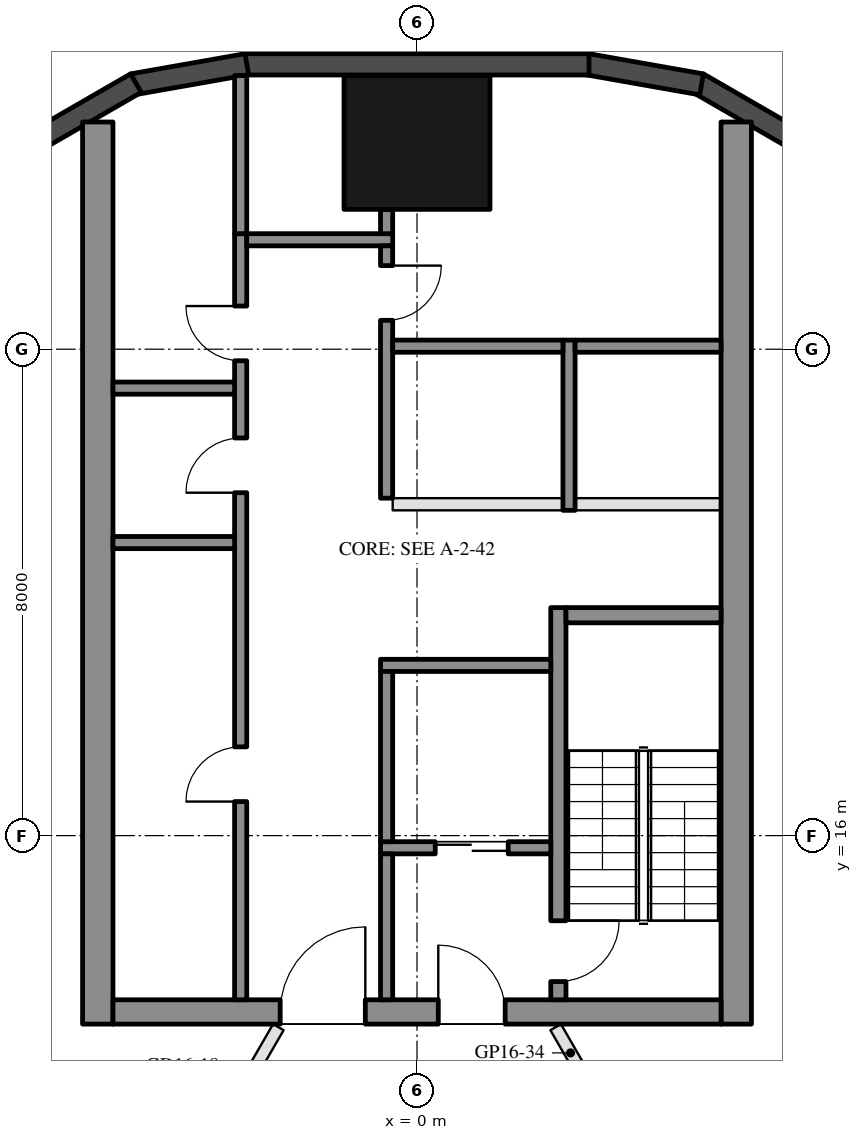
"""IFC4 building model, lengths in metres.
Left out: names, types, materials, properties, quantities, classifications, styles, units other than length and angle.
Written with IfcOpenShell. Run it as: python <this file> out.ifc"""

import sys

from ifc_helpers import new_model, si_unit, direction, frame, frame_2d, origin, origin_2d, place, context, subcontext, project, spatial, rectangle, hollow_rectangle, extrude, element, fill, save


model = new_model("IFC4")
c1 = context("Model", 3, precision=1e-05, world=origin(), true_north=direction((0.0, 1.0)))
c2 = subcontext(c1, "Body", "Model", "MODEL_VIEW")
j1 = project(units=[si_unit("LENGTHUNIT", "METRE"), si_unit("PLANEANGLEUNIT", "RADIAN")], contexts=[c1])
p1 = place(None, origin())
s1 = spatial("IfcSite", under=j1, at=p1, CompositionType="ELEMENT")
p2 = place(p1, origin())
s2 = spatial("IfcBuilding", under=s1, at=p2, CompositionType="ELEMENT")
p3 = place(p2, frame((0.0, 0.0, 179.9)))
s3 = spatial("IfcBuildingStorey", under=s2, at=p3, CompositionType="ELEMENT", Elevation=179.9)
p4 = place(p3, frame((0.0, 27.4, 0.0), z_axis=(0.0, 0.0, 1.0), x_axis=(1.0, 0.0, 0.0)))
e1 = element("IfcColumn", 1, at=p4, inside=s3, PredefinedType="COLUMN", context=c2, shape_type="SweptSolid", body=[
    extrude(hollow_rectangle(XDim=2.4, YDim=2.2, WallThickness=0.06, at=origin_2d()), origin(), (0.0, 0.0, 1.0), 3.7),
])
for number, where, z_axis, x_axis in (
    (2, (6.277, 27.422, 0.0), (0.0, 0.0, 1.0), (-0.866, 0.5, 0.0)),
    (3, (4.68, 28.356, 0.0), (0.0, 0.0, 1.0), (-0.985, 0.174, 0.0)),
):
    element("IfcWall", number, at=place(p3, frame(where, z_axis=z_axis, x_axis=x_axis)), inside=s3, PredefinedType="SOLIDWALL", context=c2, shape_type="SweptSolid", body=[
        extrude(rectangle(XDim=1.91, YDim=0.35, at=frame_2d((0.955, 0.0))), origin(), (0.0, 0.0, 1.0), 3.55),
    ])
p5 = place(p3, frame((2.829, 28.685, 0.0), z_axis=(0.0, 0.0, 1.0), x_axis=(-1.0, 0.0, 0.0)))
e4 = element("IfcWall", 4, at=p5, inside=s3, PredefinedType="SOLIDWALL", context=c2, shape_type="SweptSolid", body=[
    extrude(rectangle(XDim=5.658, YDim=0.35, at=frame_2d((2.829, 0.0))), origin(), (0.0, 0.0, 1.0), 3.55),
])
for number, where, z_axis, x_axis in (
    (5, (-2.799, 28.688, 0.0), (0.0, 0.0, 1.0), (-0.985, -0.174, 0.0)),
    (6, (-4.623, 28.377, 0.0), (0.0, 0.0, 1.0), (-0.866, -0.5, 0.0)),
):
    element("IfcWall", number, at=place(p3, frame(where, z_axis=z_axis, x_axis=x_axis)), inside=s3, PredefinedType="SOLIDWALL", context=c2, shape_type="SweptSolid", body=[
        extrude(rectangle(XDim=1.91, YDim=0.35, at=frame_2d((0.955, 0.0))), origin(), (0.0, 0.0, 1.0), 3.55),
    ])
for number, where, z_axis, x_axis in (
    (7, (5.25, 12.9, 0.0), (0.0, 0.0, 1.0), (0.0, 1.0, 0.0)),
    (8, (-5.25, 12.9, 0.0), (0.0, 0.0, 1.0), (0.0, 1.0, 0.0)),
):
    element("IfcWall", number, at=place(p3, frame(where, z_axis=z_axis, x_axis=x_axis)), inside=s3, PredefinedType="SHEAR", context=c2, shape_type="SweptSolid", body=[
        extrude(rectangle(XDim=14.837, YDim=0.5, at=frame_2d((7.418, 0.0))), origin(), (0.0, 0.0, 1.0), 3.5),
    ])
p6 = place(p3, frame((5.0, 13.1, 0.0), z_axis=(0.0, 0.0, 1.0), x_axis=(-1.0, 0.0, 0.0)))
e9 = element("IfcWall", 9, at=p6, inside=s3, PredefinedType="SHEAR", context=c2, shape_type="SweptSolid", body=[
    extrude(rectangle(XDim=10.0, YDim=0.4, at=frame_2d((5.0, 0.0))), origin(), (0.0, 0.0, 1.0), 3.5),
])
p7 = place(p6, frame((3.55, 0.0, 0.0)))
e10 = element("IfcOpeningElement", 10, at=p7, cuts=e9, PredefinedType="OPENING", context=c2, shape_type="SweptSolid", body=[
    extrude(rectangle(XDim=1.1, YDim=2.1, at=frame_2d((0.55, 1.05))), frame((0.0, 0.21, 0.0), z_axis=(0.0, -1.0, 0.0), x_axis=(1.0, 0.0, 0.0)), (0.0, 0.0, 1.0), 0.42),
])
p8 = place(p6, frame((5.85, 0.0, 0.0)))
e11 = element("IfcOpeningElement", 11, at=p8, cuts=e9, PredefinedType="OPENING", context=c2, shape_type="SweptSolid", body=[
    extrude(rectangle(XDim=1.4, YDim=2.1, at=frame_2d((0.7, 1.05))), frame((0.0, 0.21, 0.0), z_axis=(0.0, -1.0, 0.0), x_axis=(1.0, 0.0, 0.0)), (0.0, 0.0, 1.0), 0.42),
])
p9 = place(p3, frame((2.325, 13.3, 0.0), z_axis=(0.0, 0.0, 1.0), x_axis=(0.0, 1.0, 0.0)))
e12 = element("IfcWall", 12, at=p9, inside=s3, PredefinedType="SHEAR", context=c2, shape_type="SweptSolid", body=[
    extrude(rectangle(XDim=6.45, YDim=0.25, at=frame_2d((3.225, 0.0))), origin(), (0.0, 0.0, 1.0), 3.5),
])
p10 = place(p9, frame((0.3, 0.0, 0.0)))
e13 = element("IfcOpeningElement", 13, at=p10, cuts=e12, PredefinedType="OPENING", context=c2, shape_type="SweptSolid", body=[
    extrude(rectangle(XDim=1.0, YDim=2.1, at=frame_2d((0.5, 1.05))), frame((0.0, 0.135, 0.0), z_axis=(0.0, -1.0, 0.0), x_axis=(1.0, 0.0, 0.0)), (0.0, 0.0, 1.0), 0.27),
])
p11 = place(p3, frame((5.0, 19.625, 0.0), z_axis=(0.0, 0.0, 1.0), x_axis=(-1.0, 0.0, 0.0)))
e14 = element("IfcWall", 14, at=p11, inside=s3, PredefinedType="SHEAR", context=c2, shape_type="SweptSolid", body=[
    extrude(rectangle(XDim=2.55, YDim=0.25, at=frame_2d((1.275, 0.0))), origin(), (0.0, 0.0, 1.0), 3.5),
])
p12 = place(p3, frame((2.2, 18.8, 0.0), z_axis=(0.0, 0.0, 1.0), x_axis=(-1.0, 0.0, 0.0)))
e15 = element("IfcWall", 15, at=p12, inside=s3, PredefinedType="SHEAR", context=c2, shape_type="SweptSolid", body=[
    extrude(rectangle(XDim=2.8, YDim=0.2, at=frame_2d((1.4, 0.0))), origin(), (0.0, 0.0, 1.0), 3.5),
])
p13 = place(p3, frame((2.2, 15.8, 0.0), z_axis=(0.0, 0.0, 1.0), x_axis=(-1.0, 0.0, 0.0)))
e16 = element("IfcWall", 16, at=p13, inside=s3, PredefinedType="SHEAR", context=c2, shape_type="SweptSolid", body=[
    extrude(rectangle(XDim=2.8, YDim=0.2, at=frame_2d((1.4, 0.0))), origin(), (0.0, 0.0, 1.0), 3.5),
])
p14 = place(p13, frame((0.7, 0.0, 0.0)))
e17 = element("IfcOpeningElement", 17, at=p14, cuts=e16, PredefinedType="OPENING", context=c2, shape_type="SweptSolid", body=[
    extrude(rectangle(XDim=1.2, YDim=2.1, at=frame_2d((0.6, 1.05))), frame((0.0, 0.11, 0.0), z_axis=(0.0, -1.0, 0.0), x_axis=(1.0, 0.0, 0.0)), (0.0, 0.0, 1.0), 0.22),
])
p15 = place(p3, frame((-0.5, 15.9, 0.0), z_axis=(0.0, 0.0, 1.0), x_axis=(0.0, 1.0, 0.0)))
e18 = element("IfcWall", 18, at=p15, inside=s3, PredefinedType="SHEAR", context=c2, shape_type="SweptSolid", body=[
    extrude(rectangle(XDim=2.8, YDim=0.2, at=frame_2d((1.4, 0.0))), origin(), (0.0, 0.0, 1.0), 3.5),
])
p16 = place(p3, frame((-0.5, 13.3, 0.0), z_axis=(0.0, 0.0, 1.0), x_axis=(0.0, 1.0, 0.0)))
e19 = element("IfcWall", 19, at=p16, inside=s3, PredefinedType="SHEAR", context=c2, shape_type="SweptSolid", body=[
    extrude(rectangle(XDim=2.4, YDim=0.2, at=frame_2d((1.2, 0.0))), origin(), (0.0, 0.0, 1.0), 3.5),
])
p17 = place(p3, frame((-2.9, 13.3, 0.0), z_axis=(0.0, 0.0, 1.0), x_axis=(0.0, 1.0, 0.0)))
e20 = element("IfcWall", 20, at=p17, inside=s3, PredefinedType="SHEAR", context=c2, shape_type="SweptSolid", body=[
    extrude(rectangle(XDim=12.6, YDim=0.2, at=frame_2d((6.3, 0.0))), origin(), (0.0, 0.0, 1.0), 3.5),
])
p18 = place(p17, frame((3.26, 0.0, 0.0)))
e21 = element("IfcOpeningElement", 21, at=p18, cuts=e20, PredefinedType="OPENING", context=c2, shape_type="SweptSolid", body=[
    extrude(rectangle(XDim=0.9, YDim=2.1, at=frame_2d((0.45, 1.05))), frame((0.0, 0.11, 0.0), z_axis=(0.0, -1.0, 0.0), x_axis=(1.0, 0.0, 0.0)), (0.0, 0.0, 1.0), 0.22),
])
p19 = place(p17, frame((8.34, 0.0, 0.0)))
e22 = element("IfcOpeningElement", 22, at=p19, cuts=e20, PredefinedType="OPENING", context=c2, shape_type="SweptSolid", body=[
    extrude(rectangle(XDim=0.9, YDim=2.1, at=frame_2d((0.45, 1.05))), frame((0.0, 0.11, 0.0), z_axis=(0.0, -1.0, 0.0), x_axis=(1.0, 0.0, 0.0)), (0.0, 0.0, 1.0), 0.22),
])
p20 = place(p17, frame((10.51, 0.0, 0.0)))
e23 = element("IfcOpeningElement", 23, at=p20, cuts=e20, PredefinedType="OPENING", context=c2, shape_type="SweptSolid", body=[
    extrude(rectangle(XDim=0.9, YDim=2.1, at=frame_2d((0.45, 1.05))), frame((0.0, 0.11, 0.0), z_axis=(0.0, -1.0, 0.0), x_axis=(1.0, 0.0, 0.0)), (0.0, 0.0, 1.0), 0.22),
])
p21 = place(p3, frame((-0.4, 25.8, 0.0), z_axis=(0.0, 0.0, 1.0), x_axis=(-1.0, 0.0, 0.0)))
e24 = element("IfcWall", 24, at=p21, inside=s3, PredefinedType="SHEAR", context=c2, shape_type="SweptSolid", body=[
    extrude(rectangle(XDim=2.4, YDim=0.2, at=frame_2d((1.2, 0.0))), origin(), (0.0, 0.0, 1.0), 3.5),
])
p22 = place(p3, frame((-0.5, 21.55, 0.0), z_axis=(0.0, 0.0, 1.0), x_axis=(0.0, 1.0, 0.0)))
e25 = element("IfcWall", 25, at=p22, inside=s3, PredefinedType="SHEAR", context=c2, shape_type="SweptSolid", body=[
    extrude(rectangle(XDim=4.15, YDim=0.2, at=frame_2d((2.075, 0.0))), origin(), (0.0, 0.0, 1.0), 3.5),
])
p23 = place(p22, frame((2.925, 0.0, 0.0)))
e26 = element("IfcOpeningElement", 26, at=p23, cuts=e25, PredefinedType="OPENING", context=c2, shape_type="SweptSolid", body=[
    extrude(rectangle(XDim=0.9, YDim=2.1, at=frame_2d((0.45, 1.05))), frame((0.0, 0.11, 0.0), z_axis=(0.0, -1.0, 0.0), x_axis=(1.0, 0.0, 0.0)), (0.0, 0.0, 1.0), 0.22),
])
for number, where, z_axis, x_axis in (
    (27, (-3.0, 20.82, 0.0), (0.0, 0.0, 1.0), (-1.0, 0.0, 0.0)),
    (28, (-3.0, 23.36, 0.0), (0.0, 0.0, 1.0), (-1.0, 0.0, 0.0)),
):
    element("IfcWall", number, at=place(p3, frame(where, z_axis=z_axis, x_axis=x_axis)), inside=s3, PredefinedType="SHEAR", context=c2, shape_type="SweptSolid", body=[
        extrude(rectangle(XDim=2.0, YDim=0.2, at=frame_2d((1.0, 0.0))), origin(), (0.0, 0.0, 1.0), 3.5),
    ])
p24 = place(p3, frame((-0.5, 25.9, 0.0), z_axis=(0.0, 0.0, 1.0), x_axis=(0.0, 1.0, 0.0)))
e29 = element("IfcWall", 29, at=p24, inside=s3, PredefinedType="SHEAR", context=c2, shape_type="SweptSolid", body=[
    extrude(rectangle(XDim=0.4, YDim=0.2, at=frame_2d((0.2, 0.0))), origin(), (0.0, 0.0, 1.0), 3.5),
])
p25 = place(p3, frame((-2.9, 25.9, 0.0), z_axis=(0.0, 0.0, 1.0), x_axis=(0.0, 1.0, 0.0)))
e30 = element("IfcWall", 30, at=p25, inside=s3, PredefinedType="SHEAR", context=c2, shape_type="SweptSolid", body=[
    extrude(rectangle(XDim=2.6, YDim=0.2, at=frame_2d((1.3, 0.0))), origin(), (0.0, 0.0, 1.0), 3.5),
])
p26 = place(p3, frame((2.5, 21.35, 0.0), z_axis=(0.0, 0.0, 1.0), x_axis=(0.0, 1.0, 0.0)))
e31 = element("IfcWall", 31, at=p26, inside=s3, PredefinedType="SHEAR", context=c2, shape_type="SweptSolid", body=[
    extrude(rectangle(XDim=2.8, YDim=0.2, at=frame_2d((1.4, 0.0))), origin(), (0.0, 0.0, 1.0), 3.5),
])
p27 = place(p3, frame((5.0, 24.05, 0.0), z_axis=(0.0, 0.0, 1.0), x_axis=(-1.0, 0.0, 0.0)))
e32 = element("IfcWall", 32, at=p27, inside=s3, PredefinedType="SHEAR", context=c2, shape_type="SweptSolid", body=[
    extrude(rectangle(XDim=2.4, YDim=0.2, at=frame_2d((1.2, 0.0))), origin(), (0.0, 0.0, 1.0), 3.5),
])
p28 = place(p3, frame((2.4, 24.05, 0.0), z_axis=(0.0, 0.0, 1.0), x_axis=(-1.0, 0.0, 0.0)))
e33 = element("IfcWall", 33, at=p28, inside=s3, PredefinedType="SHEAR", context=c2, shape_type="SweptSolid", body=[
    extrude(rectangle(XDim=2.8, YDim=0.2, at=frame_2d((1.4, 0.0))), origin(), (0.0, 0.0, 1.0), 3.5),
])
p29 = place(p3, frame((5.0, 21.45, 0.0), z_axis=(0.0, 0.0, 1.0), x_axis=(-1.0, 0.0, 0.0)))
e34 = element("IfcWall", 34, at=p29, inside=s3, PredefinedType="PARTITIONING", context=c2, shape_type="SweptSolid", body=[
    extrude(rectangle(XDim=2.4, YDim=0.2, at=frame_2d((1.2, 0.0))), origin(), (0.0, 0.0, 1.0), 3.5),
])
p30 = place(p3, frame((2.4, 21.45, 0.0), z_axis=(0.0, 0.0, 1.0), x_axis=(-1.0, 0.0, 0.0)))
e35 = element("IfcWall", 35, at=p30, inside=s3, PredefinedType="PARTITIONING", context=c2, shape_type="SweptSolid", body=[
    extrude(rectangle(XDim=2.8, YDim=0.2, at=frame_2d((1.4, 0.0))), origin(), (0.0, 0.0, 1.0), 3.5),
])
p31 = place(p3, frame((14.377, 13.658, 0.0), z_axis=(0.0, 0.0, 1.0), x_axis=(-0.914546661299, -0.404480412762, 0.0)))
e36 = element("IfcWall", 36, at=p31, inside=s3, PredefinedType="PARTITIONING", context=c2, shape_type="SweptSolid", body=[
    extrude(rectangle(XDim=11.043, YDim=0.2, at=frame_2d((5.521, 0.0))), origin(), (0.0, 0.0, 1.0), 3.06),
])
p32 = place(p3, frame((-13.467, 13.434, 0.0), z_axis=(0.0, 0.0, 1.0), x_axis=(0.916026348045, -0.401118099426, 0.0)))
e37 = element("IfcWall", 37, at=p32, inside=s3, PredefinedType="PARTITIONING", context=c2, shape_type="SweptSolid", body=[
    extrude(rectangle(XDim=10.142, YDim=0.2, at=frame_2d((5.071, 0.0))), origin(), (0.0, 0.0, 1.0), 3.06),
])
p33 = place(p3, frame((2.281, 12.85, 0.0), z_axis=(0.0, 0.0, 1.0), x_axis=(0.499971273698, -0.866041988288, 0.0)))
e38 = element("IfcWall", 38, at=p33, inside=s3, PredefinedType="PARTITIONING", context=c2, shape_type="SweptSolid", body=[
    extrude(rectangle(XDim=4.077, YDim=0.2, at=frame_2d((2.039, 0.0))), origin(), (0.0, 0.0, 1.0), 2.95),
])
p34 = place(p33, frame((1.538, 0.0, 0.0)))
e39 = element("IfcOpeningElement", 39, at=p34, cuts=e38, PredefinedType="OPENING", context=c2, shape_type="SweptSolid", body=[
    extrude(rectangle(XDim=1.0, YDim=2.1, at=frame_2d((0.5, 1.05))), frame((0.0, 0.11, 0.0), z_axis=(0.0, -1.0, 0.0), x_axis=(1.0, 0.0, 0.0)), (0.0, 0.0, 1.0), 0.22),
])
p35 = place(p3, frame((-4.219, 9.493, 0.0), z_axis=(0.0, 0.0, 1.0), x_axis=(0.499993219391, 0.866029318535, 0.0)))
e40 = element("IfcWall", 40, at=p35, inside=s3, PredefinedType="PARTITIONING", context=c2, shape_type="SweptSolid", body=[
    extrude(rectangle(XDim=3.876, YDim=0.2, at=frame_2d((1.938, 0.0))), origin(), (0.0, 0.0, 1.0), 2.95),
])
p36 = place(p35, frame((1.438, 0.0, 0.0)))
e41 = element("IfcOpeningElement", 41, at=p36, cuts=e40, PredefinedType="OPENING", context=c2, shape_type="SweptSolid", body=[
    extrude(rectangle(XDim=1.0, YDim=2.1, at=frame_2d((0.5, 1.05))), frame((0.0, 0.11, 0.0), z_axis=(0.0, -1.0, 0.0), x_axis=(1.0, 0.0, 0.0)), (0.0, 0.0, 1.0), 0.22),
])
p37 = place(p14, origin())
e42 = element("IfcDoor", 42, at=p37, inside=s3, OperationType="DOUBLE_DOOR_SLIDING", PredefinedType="DOOR", context=c2, shape_type="SweptSolid", body=[
    extrude(rectangle(XDim=1.2, YDim=2.1, at=frame_2d((0.6, 1.05))), frame((0.0, 0.025, 0.0), z_axis=(0.0, -1.0, 0.0), x_axis=(1.0, 0.0, 0.0)), (0.0, 0.0, 1.0), 0.05),
])
fill(e17, e42)
p38 = place(p18, origin())
e43 = element("IfcDoor", 43, at=p38, inside=s3, OperationType="SINGLE_SWING_LEFT", PredefinedType="DOOR", context=c2, shape_type="SweptSolid", body=[
    extrude(rectangle(XDim=0.9, YDim=2.1, at=frame_2d((0.45, 1.05))), frame((0.0, 0.025, 0.0), z_axis=(0.0, -1.0, 0.0), x_axis=(1.0, 0.0, 0.0)), (0.0, 0.0, 1.0), 0.05),
])
fill(e21, e43)
p39 = place(p19, origin())
e44 = element("IfcDoor", 44, at=p39, inside=s3, OperationType="SINGLE_SWING_LEFT", PredefinedType="DOOR", context=c2, shape_type="SweptSolid", body=[
    extrude(rectangle(XDim=0.9, YDim=2.1, at=frame_2d((0.45, 1.05))), frame((0.0, 0.025, 0.0), z_axis=(0.0, -1.0, 0.0), x_axis=(1.0, 0.0, 0.0)), (0.0, 0.0, 1.0), 0.05),
])
fill(e22, e44)
p40 = place(p20, origin())
e45 = element("IfcDoor", 45, at=p40, inside=s3, OperationType="SINGLE_SWING_RIGHT", PredefinedType="DOOR", context=c2, shape_type="SweptSolid", body=[
    extrude(rectangle(XDim=0.9, YDim=2.1, at=frame_2d((0.45, 1.05))), frame((0.0, 0.025, 0.0), z_axis=(0.0, -1.0, 0.0), x_axis=(1.0, 0.0, 0.0)), (0.0, 0.0, 1.0), 0.05),
])
fill(e23, e45)
p41 = place(p23, frame((0.9, 0.0, 0.0), z_axis=(0.0, 0.0, 1.0), x_axis=(-1.0, 0.0, 0.0)))
e46 = element("IfcDoor", 46, at=p41, inside=s3, OperationType="SINGLE_SWING_LEFT", PredefinedType="DOOR", context=c2, shape_type="SweptSolid", body=[
    extrude(rectangle(XDim=0.9, YDim=2.1, at=frame_2d((0.45, 1.05))), frame((0.0, 0.025, 0.0), z_axis=(0.0, -1.0, 0.0), x_axis=(1.0, 0.0, 0.0)), (0.0, 0.0, 1.0), 0.05),
])
fill(e26, e46)
p42 = place(p7, frame((1.1, 0.0, 0.0), z_axis=(0.0, 0.0, 1.0), x_axis=(-1.0, 0.0, 0.0)))
e47 = element("IfcDoor", 47, at=p42, inside=s3, OperationType="SINGLE_SWING_LEFT", PredefinedType="DOOR", context=c2, shape_type="SweptSolid", body=[
    extrude(rectangle(XDim=1.1, YDim=2.1, at=frame_2d((0.55, 1.05))), frame((0.0, 0.025, 0.0), z_axis=(0.0, -1.0, 0.0), x_axis=(1.0, 0.0, 0.0)), (0.0, 0.0, 1.0), 0.05),
])
fill(e10, e47)
p43 = place(p8, frame((1.4, 0.0, 0.0), z_axis=(0.0, 0.0, 1.0), x_axis=(-1.0, 0.0, 0.0)))
e48 = element("IfcDoor", 48, at=p43, inside=s3, OperationType="DOUBLE_DOOR_SINGLE_SWING", PredefinedType="DOOR", context=c2, shape_type="SweptSolid", body=[
    extrude(rectangle(XDim=1.4, YDim=2.1, at=frame_2d((0.7, 1.05))), frame((0.0, 0.025, 0.0), z_axis=(0.0, -1.0, 0.0), x_axis=(1.0, 0.0, 0.0)), (0.0, 0.0, 1.0), 0.05),
])
fill(e11, e48)
p44 = place(p10, frame((1.0, 0.0, 0.0), z_axis=(0.0, 0.0, 1.0), x_axis=(-1.0, 0.0, 0.0)))
e49 = element("IfcDoor", 49, at=p44, inside=s3, OperationType="SINGLE_SWING_LEFT", PredefinedType="DOOR", context=c2, shape_type="SweptSolid", body=[
    extrude(rectangle(XDim=1.0, YDim=2.1, at=frame_2d((0.5, 1.05))), frame((0.0, 0.025, 0.0), z_axis=(0.0, -1.0, 0.0), x_axis=(1.0, 0.0, 0.0)), (0.0, 0.0, 1.0), 0.05),
])
fill(e13, e49)
save(model, sys.argv[1])
